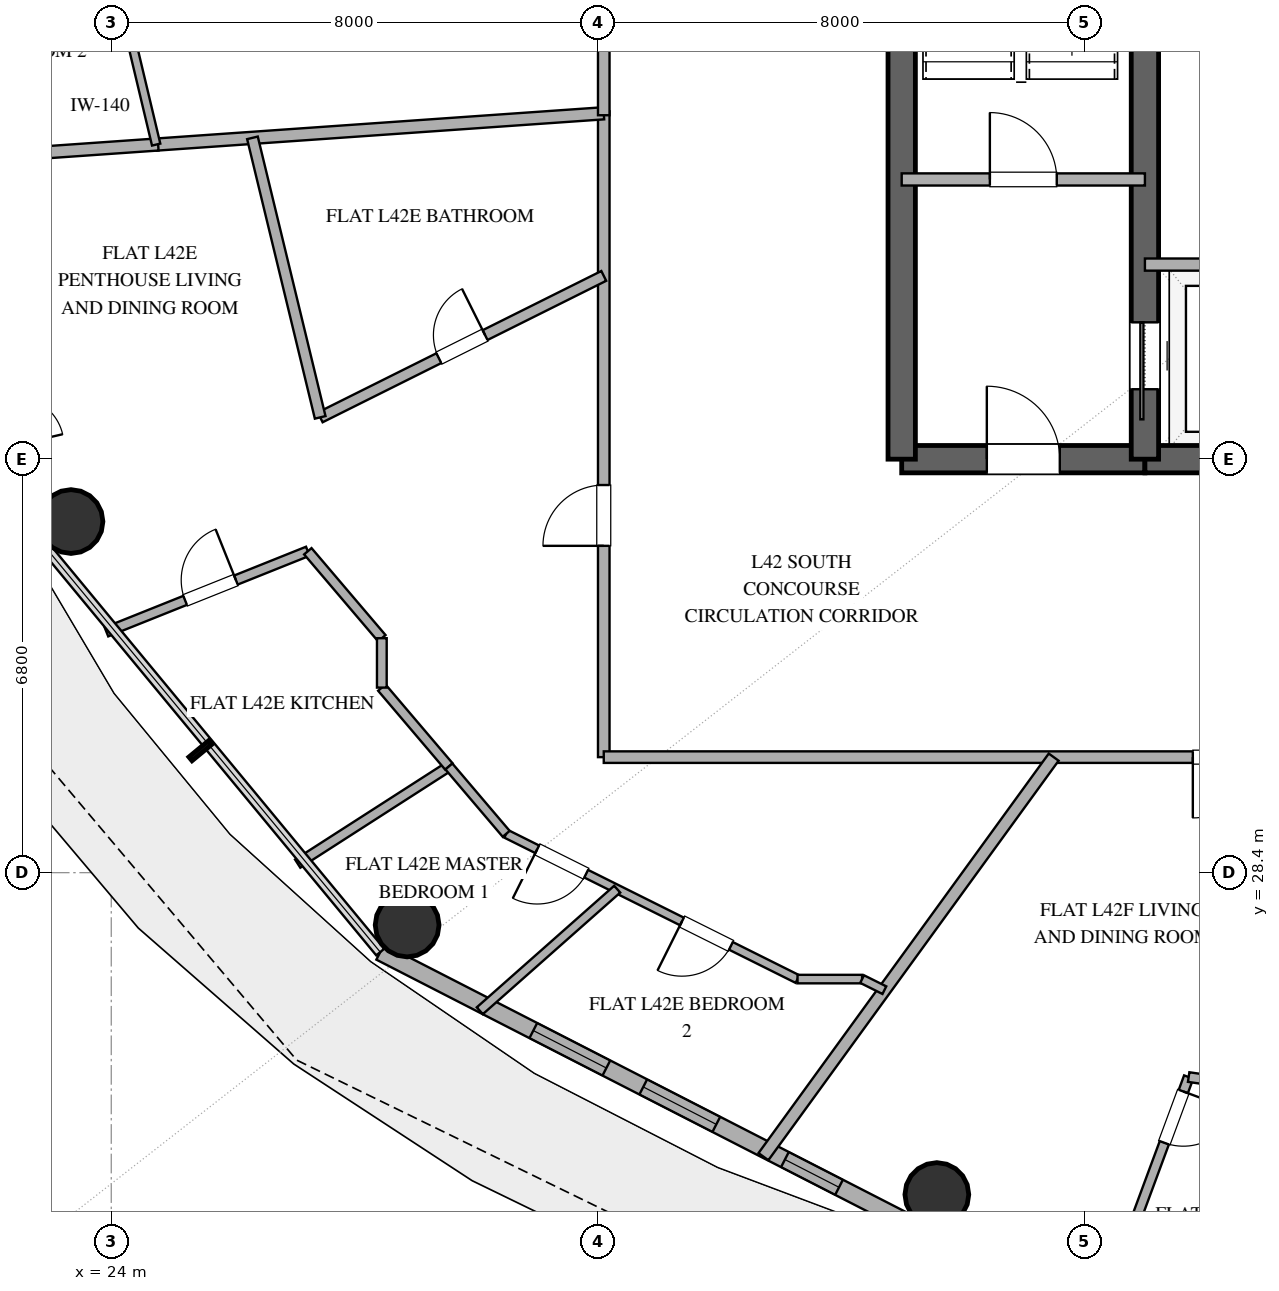
"""IFC4 building model, lengths in metres.
Left out: names, types, materials, properties, quantities, classifications, styles, units other than length and angle.
Written with IfcOpenShell. Run it as: python <this file> out.ifc"""

import sys

from ifc_helpers import new_model, si_unit, direction, frame, frame_2d, origin, origin_2d, place, context, subcontext, project, spatial, rectangle, hollow_circle, extrude, element, fill, save


model = new_model("IFC4")
c1 = context("Model", 3, precision=1e-05, world=origin(), true_north=direction((0.0, 1.0)))
c2 = subcontext(c1, "Body", "Model", "MODEL_VIEW")
j1 = project(units=[si_unit("LENGTHUNIT", "METRE"), si_unit("PLANEANGLEUNIT", "RADIAN")], contexts=[c1])
p1 = place(None, origin())
s1 = spatial("IfcSite", under=j1, at=p1, CompositionType="ELEMENT")
p2 = place(p1, origin())
s2 = spatial("IfcBuilding", under=s1, at=p2, CompositionType="ELEMENT")
p3 = place(p2, frame((0.0, 0.0, 168.6)))
s3 = spatial("IfcBuildingStorey", under=s2, at=p3, CompositionType="ELEMENT", Elevation=168.6)
p4 = place(p3, frame((37.0, 35.2, 0.0), z_axis=(0.0, 0.0, 1.0), x_axis=(1.0, 0.0, 0.0)))
e1 = element("IfcWall", 1, at=p4, inside=s3, PredefinedType="SHEAR", context=c2, shape_type="SweptSolid", body=[
    extrude(rectangle(XDim=4.0, YDim=0.45, at=frame_2d((2.0, 0.0))), origin(), (0.0, 0.0, 1.0), 3.38),
])
p5 = place(p4, frame((1.4, 0.0, 0.0)))
e2 = element("IfcOpeningElement", 2, at=p5, cuts=e1, PredefinedType="OPENING", context=c2, shape_type="SweptSolid", body=[
    extrude(rectangle(XDim=1.2, YDim=2.15, at=frame_2d((0.6, 1.075))), frame((0.0, 0.235, 0.0), z_axis=(0.0, -1.0, 0.0), x_axis=(1.0, 0.0, 0.0)), (0.0, 0.0, 1.0), 0.47),
])
p6 = place(p3, frame((41.0, 35.2, 0.0), z_axis=(0.0, 0.0, 1.0), x_axis=(1.0, 0.0, 0.0)))
e3 = element("IfcWall", 3, at=p6, inside=s3, PredefinedType="SHEAR", context=c2, shape_type="SweptSolid", body=[
    extrude(rectangle(XDim=14.0, YDim=0.45, at=frame_2d((7.0, 0.0))), origin(), (0.0, 0.0, 1.0), 3.38),
])
p7 = place(p6, frame((6.1, 0.0, 0.0)))
e4 = element("IfcOpeningElement", 4, at=p7, cuts=e3, PredefinedType="OPENING", context=c2, shape_type="SweptSolid", body=[
    extrude(rectangle(XDim=1.8, YDim=2.25, at=frame_2d((0.9, 1.125))), frame((0.0, 0.235, 0.0), z_axis=(0.0, -1.0, 0.0), x_axis=(1.0, 0.0, 0.0)), (0.0, 0.0, 1.0), 0.47),
])
p8 = place(p3, frame((37.0, 35.2, 0.0), z_axis=(0.0, 0.0, 1.0), x_axis=(0.0, 1.0, 0.0)))
e5 = element("IfcWall", 5, at=p8, inside=s3, PredefinedType="SHEAR", context=c2, shape_type="SweptSolid", body=[
    extrude(rectangle(XDim=13.6, YDim=0.45, at=frame_2d((6.8, 0.0))), origin(), (0.0, 0.0, 1.0), 3.38),
])
p9 = place(p3, frame((41.0, 35.2, 0.0), z_axis=(0.0, 0.0, 1.0), x_axis=(0.0, 1.0, 0.0)))
e6 = element("IfcWall", 6, at=p9, inside=s3, PredefinedType="SHEAR", context=c2, shape_type="SweptSolid", body=[
    extrude(rectangle(XDim=13.6, YDim=0.45, at=frame_2d((6.8, 0.0))), origin(), (0.0, 0.0, 1.0), 3.38),
])
p10 = place(p9, frame((1.15, 0.0, 0.0)))
e7 = element("IfcOpeningElement", 7, at=p10, cuts=e6, PredefinedType="OPENING", context=c2, shape_type="SweptSolid", body=[
    extrude(rectangle(XDim=1.1, YDim=2.2, at=frame_2d((0.55, 1.1))), frame((0.0, 0.235, 0.0), z_axis=(0.0, -1.0, 0.0), x_axis=(1.0, 0.0, 0.0)), (0.0, 0.0, 1.0), 0.47),
])
for number, where, z_axis, x_axis in (
    (8, (23.338, 34.174, 0.0), (0.0, 0.0, 1.0), (1.0, 0.0, 0.0)),
    (9, (28.866, 27.54, 0.0), (0.0, 0.0, 1.0), (1.0, 0.0, 0.0)),
    (10, (37.578, 23.107, 0.0), (0.0, 0.0, 1.0), (1.0, 0.0, 0.0)),
):
    element("IfcColumn", number, at=place(p3, frame(where, z_axis=z_axis, x_axis=x_axis)), inside=s3, PredefinedType="COLUMN", context=c2, shape_type="SweptSolid", body=[
        extrude(hollow_circle(Radius=0.525, WallThickness=0.028, at=origin_2d()), origin(), (0.0, 0.0, 1.0), 3.38),
    ])
p11 = place(p3, frame((28.424, 27.094, 0.0), z_axis=(0.0, 0.0, 1.0), x_axis=(0.889872523182, -0.456209263919, 0.0)))
e11 = element("IfcWall", 11, at=p11, inside=s3, PredefinedType="SOLIDWALL", context=c2, shape_type="SweptSolid", body=[
    extrude(rectangle(XDim=10.016, YDim=0.28, at=frame_2d((5.008, 0.0))), origin(), (0.0, 0.0, 1.0), 3.38),
])
p12 = place(p11, frame((2.829, 0.0, 0.85)))
e12 = element("IfcOpeningElement", 12, at=p12, cuts=e11, PredefinedType="OPENING", context=c2, shape_type="SweptSolid", body=[
    extrude(rectangle(XDim=1.35, YDim=1.8, at=frame_2d((0.675, 0.9))), frame((0.0, 0.15, 0.0), z_axis=(0.0, -1.0, 0.0), x_axis=(1.0, 0.0, 0.0)), (0.0, 0.0, 1.0), 0.3),
])
p13 = place(p11, frame((4.861, 0.0, 0.85)))
e13 = element("IfcOpeningElement", 13, at=p13, cuts=e11, PredefinedType="OPENING", context=c2, shape_type="SweptSolid", body=[
    extrude(rectangle(XDim=1.35, YDim=1.8, at=frame_2d((0.675, 0.9))), frame((0.0, 0.15, 0.0), z_axis=(0.0, -1.0, 0.0), x_axis=(1.0, 0.0, 0.0)), (0.0, 0.0, 1.0), 0.3),
])
p14 = place(p11, frame((7.479, 0.0, 0.85)))
e14 = element("IfcOpeningElement", 14, at=p14, cuts=e11, PredefinedType="OPENING", context=c2, shape_type="SweptSolid", body=[
    extrude(rectangle(XDim=1.0, YDim=1.8, at=frame_2d((0.5, 0.9))), frame((0.0, 0.15, 0.0), z_axis=(0.0, -1.0, 0.0), x_axis=(1.0, 0.0, 0.0)), (0.0, 0.0, 1.0), 0.3),
])
p15 = place(p3, frame((37.0, 39.8, 0.0), z_axis=(0.0, 0.0, 1.0), x_axis=(1.0, 0.0, 0.0)))
e15 = element("IfcWall", 15, at=p15, inside=s3, PredefinedType="SOLIDWALL", context=c2, shape_type="SweptSolid", body=[
    extrude(rectangle(XDim=4.0, YDim=0.2, at=frame_2d((2.0, 0.0))), origin(), (0.0, 0.0, 1.0), 2.74),
])
p16 = place(p15, frame((1.45, 0.0, 0.0)))
e16 = element("IfcOpeningElement", 16, at=p16, cuts=e15, PredefinedType="OPENING", context=c2, shape_type="SweptSolid", body=[
    extrude(rectangle(XDim=1.1, YDim=2.15, at=frame_2d((0.55, 1.075))), frame((0.0, 0.11, 0.0), z_axis=(0.0, -1.0, 0.0), x_axis=(1.0, 0.0, 0.0)), (0.0, 0.0, 1.0), 0.22),
])
p17 = place(p3, frame((41.0, 38.4, 0.0), z_axis=(0.0, 0.0, 1.0), x_axis=(1.0, 0.0, 0.0)))
e17 = element("IfcWall", 17, at=p17, inside=s3, PredefinedType="SOLIDWALL", context=c2, shape_type="SweptSolid", body=[
    extrude(rectangle(XDim=2.95, YDim=0.2, at=frame_2d((1.475, 0.0))), origin(), (0.0, 0.0, 1.0), 2.74),
])
p18 = place(p3, frame((32.1, 30.3, 0.0), z_axis=(0.0, 0.0, 1.0), x_axis=(0.0, 1.0, 0.0)))
e18 = element("IfcWall", 18, at=p18, inside=s3, PredefinedType="PARTITIONING", context=c2, shape_type="SweptSolid", body=[
    extrude(rectangle(XDim=10.62, YDim=0.19, at=frame_2d((5.31, 0.0))), origin(), (0.0, 0.0, 1.0), 2.74),
])
p19 = place(p18, frame((3.475, 0.0, 0.0)))
e19 = element("IfcOpeningElement", 19, at=p19, cuts=e18, PredefinedType="OPENING", context=c2, shape_type="SweptSolid", body=[
    extrude(rectangle(XDim=1.0, YDim=2.2, at=frame_2d((0.5, 1.1))), frame((0.0, 0.105, 0.0), z_axis=(0.0, -1.0, 0.0), x_axis=(1.0, 0.0, 0.0)), (0.0, 0.0, 1.0), 0.21),
])
p20 = place(p3, frame((48.308, 30.3, 0.0), z_axis=(0.0, 0.0, 1.0), x_axis=(-1.0, 0.0, 0.0)))
e20 = element("IfcWall", 20, at=p20, inside=s3, PredefinedType="PARTITIONING", context=c2, shape_type="SweptSolid", body=[
    extrude(rectangle(XDim=16.208, YDim=0.19, at=frame_2d((8.104, 0.0))), origin(), (0.0, 0.0, 1.0), 2.74),
])
p21 = place(p20, frame((5.52, 0.0, 0.0)))
e21 = element("IfcOpeningElement", 21, at=p21, cuts=e20, PredefinedType="OPENING", context=c2, shape_type="SweptSolid", body=[
    extrude(rectangle(XDim=1.0, YDim=2.2, at=frame_2d((0.5, 1.1))), frame((0.0, 0.105, 0.0), z_axis=(0.0, -1.0, 0.0), x_axis=(1.0, 0.0, 0.0)), (0.0, 0.0, 1.0), 0.21),
])
p22 = place(p3, frame((32.1, 40.888, 0.0), z_axis=(0.0, 0.0, 1.0), x_axis=(-0.997562906323, -0.069772830877, 0.0)))
e22 = element("IfcWall", 22, at=p22, inside=s3, PredefinedType="PARTITIONING", context=c2, shape_type="SweptSolid", body=[
    extrude(rectangle(XDim=7.38, YDim=0.2, at=frame_2d((3.69, 0.0))), origin(), (0.0, 0.0, 1.0), 2.74),
])
p23 = place(p3, frame((32.1, 40.856, 0.0), z_axis=(0.0, 0.0, 1.0), x_axis=(0.0, 1.0, 0.0)))
e23 = element("IfcWall", 23, at=p23, inside=s3, PredefinedType="PARTITIONING", context=c2, shape_type="SweptSolid", body=[
    extrude(rectangle(XDim=12.844, YDim=0.19, at=frame_2d((6.422, 0.0))), origin(), (0.0, 0.0, 1.0), 2.74),
])
p24 = place(p3, frame((27.436, 35.887, 0.0), z_axis=(0.0, 0.0, 1.0), x_axis=(0.894857716432, 0.446351506485, 0.0)))
e24 = element("IfcWall", 24, at=p24, inside=s3, PredefinedType="PLUMBINGWALL", context=c2, shape_type="SweptSolid", body=[
    extrude(rectangle(XDim=5.212, YDim=0.18, at=frame_2d((2.606, 0.0))), origin(), (0.0, 0.0, 1.0), 2.74),
])
p25 = place(p24, frame((2.181, 0.0, 0.0)))
e25 = element("IfcOpeningElement", 25, at=p25, cuts=e24, PredefinedType="OPENING", context=c2, shape_type="SweptSolid", body=[
    extrude(rectangle(XDim=0.85, YDim=2.1, at=frame_2d((0.425, 1.05))), frame((0.0, 0.1, 0.0), z_axis=(0.0, -1.0, 0.0), x_axis=(1.0, 0.0, 0.0)), (0.0, 0.0, 1.0), 0.2),
])
p26 = place(p3, frame((34.726, 23.73, 0.0), z_axis=(0.0, 0.0, 1.0), x_axis=(0.587785528328, 0.809016793823, 0.0)))
e26 = element("IfcWall", 26, at=p26, inside=s3, PredefinedType="PARTITIONING", context=c2, shape_type="SweptSolid", body=[
    extrude(rectangle(XDim=8.121, YDim=0.2, at=frame_2d((4.061, 0.0))), origin(), (0.0, 0.0, 1.0), 2.74),
])
p27 = place(p3, frame((26.322, 40.484, 0.0), z_axis=(0.0, 0.0, 1.0), x_axis=(0.235484788327, -0.971878034769, 0.0)))
e27 = element("IfcWall", 27, at=p27, inside=s3, PredefinedType="PLUMBINGWALL", context=c2, shape_type="SweptSolid", body=[
    extrude(rectangle(XDim=4.73, YDim=0.18, at=frame_2d((2.365, 0.0))), origin(), (0.0, 0.0, 1.0), 2.74),
])
p28 = place(p3, frame((23.921, 32.36, 0.0), z_axis=(0.0, 0.0, 1.0), x_axis=(0.928353942887, 0.371697399408, 0.0)))
e28 = element("IfcWall", 28, at=p28, inside=s3, PredefinedType="PLUMBINGWALL", context=c2, shape_type="SweptSolid", body=[
    extrude(rectangle(XDim=3.568, YDim=0.16, at=frame_2d((1.784, 0.0))), origin(), (0.0, 0.0, 1.0), 2.74),
])
p29 = place(p28, frame((1.394, 0.0, 0.0)))
e29 = element("IfcOpeningElement", 29, at=p29, cuts=e28, PredefinedType="OPENING", context=c2, shape_type="SweptSolid", body=[
    extrude(rectangle(XDim=0.9, YDim=2.1, at=frame_2d((0.45, 1.05))), frame((0.0, 0.09, 0.0), z_axis=(0.0, -1.0, 0.0), x_axis=(1.0, 0.0, 0.0)), (0.0, 0.0, 1.0), 0.18),
])
p30 = place(p3, frame((21.212, 40.127, 0.0), z_axis=(0.0, 0.0, 1.0), x_axis=(0.997565256009, 0.069739228586, 0.0)))
e30 = element("IfcWall", 30, at=p30, inside=s3, PredefinedType="PARTITIONING", context=c2, shape_type="SweptSolid", body=[
    extrude(rectangle(XDim=3.567, YDim=0.2, at=frame_2d((1.784, 0.0))), origin(), (0.0, 0.0, 1.0), 2.74),
])
p31 = place(p3, frame((35.287, 26.65, 0.0), z_axis=(0.0, 0.0, 1.0), x_axis=(-0.894937323042, 0.44619187333, 0.0)))
e31 = element("IfcWall", 31, at=p31, inside=s3, PredefinedType="PARTITIONING", context=c2, shape_type="SweptSolid", body=[
    extrude(rectangle(XDim=5.354, YDim=0.14, at=frame_2d((2.677, 0.0))), origin(), (0.0, 0.0, 1.0), 2.74),
])
p32 = place(p31, frame((1.224, 0.0, 0.0)))
e32 = element("IfcOpeningElement", 32, at=p32, cuts=e31, PredefinedType="OPENING", context=c2, shape_type="SweptSolid", body=[
    extrude(rectangle(XDim=0.9, YDim=2.1, at=frame_2d((0.45, 1.05))), frame((0.0, 0.08, 0.0), z_axis=(0.0, -1.0, 0.0), x_axis=(1.0, 0.0, 0.0)), (0.0, 0.0, 1.0), 0.16),
])
p33 = place(p31, frame((3.884, 0.0, 0.0)))
e33 = element("IfcOpeningElement", 33, at=p33, cuts=e31, PredefinedType="OPENING", context=c2, shape_type="SweptSolid", body=[
    extrude(rectangle(XDim=0.9, YDim=2.1, at=frame_2d((0.45, 1.05))), frame((0.0, 0.08, 0.0), z_axis=(0.0, -1.0, 0.0), x_axis=(1.0, 0.0, 0.0)), (0.0, 0.0, 1.0), 0.16),
])
p34 = place(p3, frame((41.719, 25.039, 0.0), z_axis=(0.0, 0.0, 1.0), x_axis=(-0.347266531909, -0.937766471898, 0.0)))
e34 = element("IfcWall", 34, at=p34, inside=s3, PredefinedType="PLUMBINGWALL", context=c2, shape_type="SweptSolid", body=[
    extrude(rectangle(XDim=3.325, YDim=0.16, at=frame_2d((1.663, 0.0))), origin(), (0.0, 0.0, 1.0), 2.74),
])
p35 = place(p34, frame((0.253, 0.0, 0.0)))
e35 = element("IfcOpeningElement", 35, at=p35, cuts=e34, PredefinedType="OPENING", context=c2, shape_type="SweptSolid", body=[
    extrude(rectangle(XDim=0.9, YDim=2.1, at=frame_2d((0.45, 1.05))), frame((0.0, 0.09, 0.0), z_axis=(0.0, -1.0, 0.0), x_axis=(1.0, 0.0, 0.0)), (0.0, 0.0, 1.0), 0.18),
])
p36 = place(p3, frame((48.0, 24.12, 0.0), z_axis=(0.0, 0.0, 1.0), x_axis=(-0.989475575411, 0.144699985022, 0.0)))
e36 = element("IfcWall", 36, at=p36, inside=s3, PredefinedType="PLUMBINGWALL", context=c2, shape_type="SweptSolid", body=[
    extrude(rectangle(XDim=6.347, YDim=0.16, at=frame_2d((3.174, 0.0))), origin(), (0.0, 0.0, 1.0), 2.74),
])
p37 = place(p36, frame((1.685, 0.0, 0.0)))
e37 = element("IfcOpeningElement", 37, at=p37, cuts=e36, PredefinedType="OPENING", context=c2, shape_type="SweptSolid", body=[
    extrude(rectangle(XDim=0.9, YDim=2.1, at=frame_2d((0.45, 1.05))), frame((0.0, 0.09, 0.0), z_axis=(0.0, -1.0, 0.0), x_axis=(1.0, 0.0, 0.0)), (0.0, 0.0, 1.0), 0.18),
])
p38 = place(p3, frame((32.321, 28.128, 0.0), z_axis=(0.0, 0.0, 1.0), x_axis=(-0.748956405403, -0.6626192744, 0.0)))
e38 = element("IfcWall", 38, at=p38, inside=s3, PredefinedType="PARTITIONING", context=c2, shape_type="SweptSolid", body=[
    extrude(rectangle(XDim=3.017, YDim=0.15, at=frame_2d((1.509, 0.0))), origin(), (0.0, 0.0, 1.0), 2.74),
])
p39 = place(p3, frame((29.553, 30.146, 0.0), z_axis=(0.0, 0.0, 1.0), x_axis=(-0.841296531109, -0.540573904978, 0.0)))
e39 = element("IfcWall", 39, at=p39, inside=s3, PredefinedType="PLUMBINGWALL", context=c2, shape_type="SweptSolid", body=[
    extrude(rectangle(XDim=2.956, YDim=0.16, at=frame_2d((1.478, 0.0))), origin(), (0.0, 0.0, 1.0), 2.74),
])
p40 = place(p3, frame((27.233, 33.686, 0.0), z_axis=(0.0, 0.0, 1.0), x_axis=(0.648078524475, -0.761573519835, 0.0)))
e40 = element("IfcWall", 40, at=p40, inside=s3, PredefinedType="PLUMBINGWALL", context=c2, shape_type="SweptSolid", body=[
    extrude(rectangle(XDim=1.878, YDim=0.16, at=frame_2d((0.939, 0.0))), origin(), (0.0, 0.0, 1.0), 2.74),
])
p41 = place(p3, frame((28.45, 31.443, 0.0), z_axis=(0.0, 0.0, 1.0), x_axis=(0.64788149294, -0.761741144422, 0.0)))
e41 = element("IfcWall", 41, at=p41, inside=s3, PredefinedType="PLUMBINGWALL", context=c2, shape_type="SweptSolid", body=[
    extrude(rectangle(XDim=1.702, YDim=0.16, at=frame_2d((0.851, 0.0))), origin(), (0.0, 0.0, 1.0), 2.74),
])
p42 = place(p3, frame((24.739, 40.373, 0.0), z_axis=(0.0, 0.0, 1.0), x_axis=(-0.231561310927, 0.972820311919, 0.0)))
e42 = element("IfcWall", 42, at=p42, inside=s3, PredefinedType="PARTITIONING", context=c2, shape_type="SweptSolid", body=[
    extrude(rectangle(XDim=1.672, YDim=0.14, at=frame_2d((0.836, 0.0))), origin(), (0.0, 0.0, 1.0), 2.74),
])
p43 = place(p3, frame((29.553, 30.146, 0.0), z_axis=(0.0, 0.0, 1.0), x_axis=(0.647896934681, -0.761728010533, 0.0)))
e43 = element("IfcWall", 43, at=p43, inside=s3, PredefinedType="PARTITIONING", context=c2, shape_type="SweptSolid", body=[
    extrude(rectangle(XDim=1.454, YDim=0.15, at=frame_2d((0.727, 0.0))), origin(), (0.0, 0.0, 1.0), 2.74),
])
p44 = place(p3, frame((36.349, 26.65, 0.0), z_axis=(0.0, 0.0, 1.0), x_axis=(-1.0, 0.0, 0.0)))
e44 = element("IfcWall", 44, at=p44, inside=s3, PredefinedType="PARTITIONING", context=c2, shape_type="SweptSolid", body=[
    extrude(rectangle(XDim=1.062, YDim=0.14, at=frame_2d((0.531, 0.0))), origin(), (0.0, 0.0, 1.0), 2.74),
])
p45 = place(p3, frame((28.45, 32.256, 0.0), z_axis=(0.0, 0.0, 1.0), x_axis=(0.0, -1.0, 0.0)))
e45 = element("IfcWall", 45, at=p45, inside=s3, PredefinedType="PLUMBINGWALL", context=c2, shape_type="SweptSolid", body=[
    extrude(rectangle(XDim=0.812, YDim=0.16, at=frame_2d((0.406, 0.0))), origin(), (0.0, 0.0, 1.0), 2.74),
])
p46 = place(p3, frame((36.715, 26.468, 0.0), z_axis=(0.0, 0.0, 1.0), x_axis=(-0.895142158028, 0.445780794698, 0.0)))
e46 = element("IfcWall", 46, at=p46, inside=s3, PredefinedType="PARTITIONING", context=c2, shape_type="SweptSolid", body=[
    extrude(rectangle(XDim=0.409, YDim=0.14, at=frame_2d((0.205, 0.0))), origin(), (0.0, 0.0, 1.0), 2.74),
])
p47 = place(p12, origin())
e47 = element("IfcWindow", 47, at=p47, inside=s3, PartitioningType="SINGLE_PANEL", PredefinedType="WINDOW", context=c2, shape_type="SweptSolid", body=[
    extrude(rectangle(XDim=1.35, YDim=1.8, at=frame_2d((0.675, 0.9))), frame((0.0, 0.03, 0.0), z_axis=(0.0, -1.0, 0.0), x_axis=(1.0, 0.0, 0.0)), (0.0, 0.0, 1.0), 0.06),
])
fill(e12, e47)
p48 = place(p13, origin())
e48 = element("IfcWindow", 48, at=p48, inside=s3, PartitioningType="SINGLE_PANEL", PredefinedType="WINDOW", context=c2, shape_type="SweptSolid", body=[
    extrude(rectangle(XDim=1.35, YDim=1.8, at=frame_2d((0.675, 0.9))), frame((0.0, 0.03, 0.0), z_axis=(0.0, -1.0, 0.0), x_axis=(1.0, 0.0, 0.0)), (0.0, 0.0, 1.0), 0.06),
])
fill(e13, e48)
p49 = place(p14, origin())
e49 = element("IfcWindow", 49, at=p49, inside=s3, PartitioningType="SINGLE_PANEL", PredefinedType="WINDOW", context=c2, shape_type="SweptSolid", body=[
    extrude(rectangle(XDim=1.0, YDim=1.8, at=frame_2d((0.5, 0.9))), frame((0.0, 0.03, 0.0), z_axis=(0.0, -1.0, 0.0), x_axis=(1.0, 0.0, 0.0)), (0.0, 0.0, 1.0), 0.06),
])
fill(e14, e49)
p50 = place(p10, origin())
e50 = element("IfcDoor", 50, at=p50, inside=s3, OperationType="SLIDING_TO_LEFT", PredefinedType="DOOR", context=c2, shape_type="SweptSolid", body=[
    extrude(rectangle(XDim=1.1, YDim=2.2, at=frame_2d((0.55, 1.1))), frame((0.0, 0.025, 0.0), z_axis=(0.0, -1.0, 0.0), x_axis=(1.0, 0.0, 0.0)), (0.0, 0.0, 1.0), 0.05),
])
fill(e7, e50)
p51 = place(p5, origin())
e51 = element("IfcDoor", 51, at=p51, inside=s3, OperationType="SINGLE_SWING_LEFT", PredefinedType="DOOR", context=c2, shape_type="SweptSolid", body=[
    extrude(rectangle(XDim=1.2, YDim=2.15, at=frame_2d((0.6, 1.075))), frame((0.0, 0.025, 0.0), z_axis=(0.0, -1.0, 0.0), x_axis=(1.0, 0.0, 0.0)), (0.0, 0.0, 1.0), 0.05),
])
fill(e2, e51)
p52 = place(p16, origin())
e52 = element("IfcDoor", 52, at=p52, inside=s3, OperationType="SINGLE_SWING_LEFT", PredefinedType="DOOR", context=c2, shape_type="SweptSolid", body=[
    extrude(rectangle(XDim=1.1, YDim=2.15, at=frame_2d((0.55, 1.075))), frame((0.0, 0.025, 0.0), z_axis=(0.0, -1.0, 0.0), x_axis=(1.0, 0.0, 0.0)), (0.0, 0.0, 1.0), 0.05),
])
fill(e16, e52)
p53 = place(p19, origin())
e53 = element("IfcDoor", 53, at=p53, inside=s3, OperationType="SINGLE_SWING_LEFT", PredefinedType="DOOR", context=c2, shape_type="SweptSolid", body=[
    extrude(rectangle(XDim=1.0, YDim=2.2, at=frame_2d((0.5, 1.1))), frame((0.0, 0.025, 0.0), z_axis=(0.0, -1.0, 0.0), x_axis=(1.0, 0.0, 0.0)), (0.0, 0.0, 1.0), 0.05),
])
fill(e19, e53)
p54 = place(p21, origin())
e54 = element("IfcDoor", 54, at=p54, inside=s3, OperationType="SINGLE_SWING_RIGHT", PredefinedType="DOOR", context=c2, shape_type="SweptSolid", body=[
    extrude(rectangle(XDim=1.0, YDim=2.2, at=frame_2d((0.5, 1.1))), frame((0.0, 0.025, 0.0), z_axis=(0.0, -1.0, 0.0), x_axis=(1.0, 0.0, 0.0)), (0.0, 0.0, 1.0), 0.05),
])
fill(e21, e54)
p55 = place(p25, origin())
e55 = element("IfcDoor", 55, at=p55, inside=s3, OperationType="SINGLE_SWING_RIGHT", PredefinedType="DOOR", context=c2, shape_type="SweptSolid", body=[
    extrude(rectangle(XDim=0.85, YDim=2.1, at=frame_2d((0.425, 1.05))), frame((0.0, 0.025, 0.0), z_axis=(0.0, -1.0, 0.0), x_axis=(1.0, 0.0, 0.0)), (0.0, 0.0, 1.0), 0.05),
])
fill(e25, e55)
p56 = place(p29, origin())
e56 = element("IfcDoor", 56, at=p56, inside=s3, OperationType="SINGLE_SWING_RIGHT", PredefinedType="DOOR", context=c2, shape_type="SweptSolid", body=[
    extrude(rectangle(XDim=0.9, YDim=2.1, at=frame_2d((0.45, 1.05))), frame((0.0, 0.025, 0.0), z_axis=(0.0, -1.0, 0.0), x_axis=(1.0, 0.0, 0.0)), (0.0, 0.0, 1.0), 0.05),
])
fill(e29, e56)
p57 = place(p32, origin())
e57 = element("IfcDoor", 57, at=p57, inside=s3, OperationType="SINGLE_SWING_RIGHT", PredefinedType="DOOR", context=c2, shape_type="SweptSolid", body=[
    extrude(rectangle(XDim=0.9, YDim=2.1, at=frame_2d((0.45, 1.05))), frame((0.0, 0.025, 0.0), z_axis=(0.0, -1.0, 0.0), x_axis=(1.0, 0.0, 0.0)), (0.0, 0.0, 1.0), 0.05),
])
fill(e32, e57)
p58 = place(p33, origin())
e58 = element("IfcDoor", 58, at=p58, inside=s3, OperationType="SINGLE_SWING_RIGHT", PredefinedType="DOOR", context=c2, shape_type="SweptSolid", body=[
    extrude(rectangle(XDim=0.9, YDim=2.1, at=frame_2d((0.45, 1.05))), frame((0.0, 0.025, 0.0), z_axis=(0.0, -1.0, 0.0), x_axis=(1.0, 0.0, 0.0)), (0.0, 0.0, 1.0), 0.05),
])
fill(e33, e58)
p59 = place(p35, origin())
e59 = element("IfcDoor", 59, at=p59, inside=s3, OperationType="SINGLE_SWING_LEFT", PredefinedType="DOOR", context=c2, shape_type="SweptSolid", body=[
    extrude(rectangle(XDim=0.9, YDim=2.1, at=frame_2d((0.45, 1.05))), frame((0.0, 0.025, 0.0), z_axis=(0.0, -1.0, 0.0), x_axis=(1.0, 0.0, 0.0)), (0.0, 0.0, 1.0), 0.05),
])
fill(e35, e59)
save(model, sys.argv[1])
